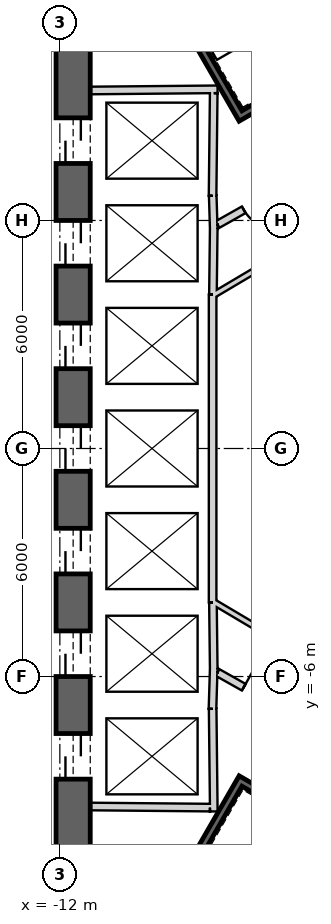
"""IFC4 building model, lengths in metres.
Left out: names, types, materials, properties, quantities, classifications, styles, units other than length and angle.
Written with IfcOpenShell. Run it as: python <this file> out.ifc"""

import sys

from ifc_helpers import new_model, si_unit, direction, frame, frame_2d, origin, place, context, subcontext, project, spatial, rectangle, extrude, element, fill, save


model = new_model("IFC4")
c1 = context("Model", 3, precision=1e-05, world=origin(), true_north=direction((0.0, 1.0)))
c2 = subcontext(c1, "Body", "Model", "MODEL_VIEW")
j1 = project(units=[si_unit("LENGTHUNIT", "METRE"), si_unit("PLANEANGLEUNIT", "RADIAN")], contexts=[c1])
p1 = place(None, origin())
s1 = spatial("IfcSite", under=j1, at=p1, CompositionType="ELEMENT")
p2 = place(p1, origin())
s2 = spatial("IfcBuilding", under=s1, at=p2, CompositionType="ELEMENT")
p3 = place(p2, frame((0.0, 0.0, 357.2)))
s3 = spatial("IfcBuildingStorey", under=s2, at=p3, CompositionType="ELEMENT", Elevation=357.2)
p4 = place(p3, frame((19.475, 2.208, 0.0), z_axis=(0.0, 0.0, 1.0), x_axis=(-0.866028369851, 0.499994862586, 0.0)))
e1 = element("IfcWall", 1, at=p4, inside=s3, PredefinedType="SHEAR", context=c2, shape_type="SweptSolid", body=[
    extrude(rectangle(XDim=31.523, YDim=0.9, at=frame_2d((15.762, 0.0))), origin(), (0.0, 0.0, 1.0), 3.9),
])
p5 = place(p4, frame((7.062, 0.0, 0.0)))
e2 = element("IfcOpeningElement", 2, at=p5, cuts=e1, PredefinedType="OPENING", context=c2, shape_type="SweptSolid", body=[
    extrude(rectangle(XDim=1.2, YDim=2.4, at=frame_2d((0.6, 1.2))), frame((0.0, 0.46, 0.0), z_axis=(0.0, -1.0, 0.0), x_axis=(1.0, 0.0, 0.0)), (0.0, 0.0, 1.0), 0.92),
])
p6 = place(p4, frame((3.612, 0.0, 0.0)))
e3 = element("IfcOpeningElement", 3, at=p6, cuts=e1, PredefinedType="OPENING", context=c2, shape_type="SweptSolid", body=[
    extrude(rectangle(XDim=1.2, YDim=2.4, at=frame_2d((0.6, 1.2))), frame((0.0, 0.46, 0.0), z_axis=(0.0, -1.0, 0.0), x_axis=(1.0, 0.0, 0.0)), (0.0, 0.0, 1.0), 0.92),
])
p7 = place(p4, frame((26.712, 0.0, 0.0)))
e4 = element("IfcOpeningElement", 4, at=p7, cuts=e1, PredefinedType="OPENING", context=c2, shape_type="SweptSolid", body=[
    extrude(rectangle(XDim=1.2, YDim=2.4, at=frame_2d((0.6, 1.2))), frame((0.0, 0.46, 0.0), z_axis=(0.0, -1.0, 0.0), x_axis=(1.0, 0.0, 0.0)), (0.0, 0.0, 1.0), 0.92),
])
p8 = place(p3, frame((-11.65, 15.762, 0.0), z_axis=(0.0, 0.0, 1.0), x_axis=(0.0, -1.0, 0.0)))
e5 = element("IfcWall", 5, at=p8, inside=s3, PredefinedType="SHEAR", context=c2, shape_type="SweptSolid", body=[
    extrude(rectangle(XDim=31.523, YDim=0.9, at=frame_2d((15.762, 0.0))), origin(), (0.0, 0.0, 1.0), 3.9),
])
p9 = place(p8, frame((7.062, 0.0, 0.0)))
e6 = element("IfcOpeningElement", 6, at=p9, cuts=e5, PredefinedType="OPENING", context=c2, shape_type="SweptSolid", body=[
    extrude(rectangle(XDim=1.2, YDim=2.4, at=frame_2d((0.6, 1.2))), frame((0.0, 0.46, 0.0), z_axis=(0.0, -1.0, 0.0), x_axis=(1.0, 0.0, 0.0)), (0.0, 0.0, 1.0), 0.92),
])
p10 = place(p8, frame((9.762, 0.0, 0.0)))
e7 = element("IfcOpeningElement", 7, at=p10, cuts=e5, PredefinedType="OPENING", context=c2, shape_type="SweptSolid", body=[
    extrude(rectangle(XDim=1.2, YDim=2.4, at=frame_2d((0.6, 1.2))), frame((0.0, 0.46, 0.0), z_axis=(0.0, -1.0, 0.0), x_axis=(1.0, 0.0, 0.0)), (0.0, 0.0, 1.0), 0.92),
])
p11 = place(p8, frame((12.462, 0.0, 0.0)))
e8 = element("IfcOpeningElement", 8, at=p11, cuts=e5, PredefinedType="OPENING", context=c2, shape_type="SweptSolid", body=[
    extrude(rectangle(XDim=1.2, YDim=2.4, at=frame_2d((0.6, 1.2))), frame((0.0, 0.46, 0.0), z_axis=(0.0, -1.0, 0.0), x_axis=(1.0, 0.0, 0.0)), (0.0, 0.0, 1.0), 0.92),
])
p12 = place(p8, frame((15.162, 0.0, 0.0)))
e9 = element("IfcOpeningElement", 9, at=p12, cuts=e5, PredefinedType="OPENING", context=c2, shape_type="SweptSolid", body=[
    extrude(rectangle(XDim=1.2, YDim=2.4, at=frame_2d((0.6, 1.2))), frame((0.0, 0.46, 0.0), z_axis=(0.0, -1.0, 0.0), x_axis=(1.0, 0.0, 0.0)), (0.0, 0.0, 1.0), 0.92),
])
p13 = place(p8, frame((17.862, 0.0, 0.0)))
e10 = element("IfcOpeningElement", 10, at=p13, cuts=e5, PredefinedType="OPENING", context=c2, shape_type="SweptSolid", body=[
    extrude(rectangle(XDim=1.2, YDim=2.4, at=frame_2d((0.6, 1.2))), frame((0.0, 0.46, 0.0), z_axis=(0.0, -1.0, 0.0), x_axis=(1.0, 0.0, 0.0)), (0.0, 0.0, 1.0), 0.92),
])
p14 = place(p8, frame((20.562, 0.0, 0.0)))
e11 = element("IfcOpeningElement", 11, at=p14, cuts=e5, PredefinedType="OPENING", context=c2, shape_type="SweptSolid", body=[
    extrude(rectangle(XDim=1.2, YDim=2.4, at=frame_2d((0.6, 1.2))), frame((0.0, 0.46, 0.0), z_axis=(0.0, -1.0, 0.0), x_axis=(1.0, 0.0, 0.0)), (0.0, 0.0, 1.0), 0.92),
])
p15 = place(p8, frame((23.262, 0.0, 0.0)))
e12 = element("IfcOpeningElement", 12, at=p15, cuts=e5, PredefinedType="OPENING", context=c2, shape_type="SweptSolid", body=[
    extrude(rectangle(XDim=1.2, YDim=2.4, at=frame_2d((0.6, 1.2))), frame((0.0, 0.46, 0.0), z_axis=(0.0, -1.0, 0.0), x_axis=(1.0, 0.0, 0.0)), (0.0, 0.0, 1.0), 0.92),
])
p16 = place(p8, frame((3.612, 0.0, 0.0)))
e13 = element("IfcOpeningElement", 13, at=p16, cuts=e5, PredefinedType="OPENING", context=c2, shape_type="SweptSolid", body=[
    extrude(rectangle(XDim=1.2, YDim=2.4, at=frame_2d((0.6, 1.2))), frame((0.0, 0.46, 0.0), z_axis=(0.0, -1.0, 0.0), x_axis=(1.0, 0.0, 0.0)), (0.0, 0.0, 1.0), 0.92),
])
p17 = place(p8, frame((26.712, 0.0, 0.0)))
e14 = element("IfcOpeningElement", 14, at=p17, cuts=e5, PredefinedType="OPENING", context=c2, shape_type="SweptSolid", body=[
    extrude(rectangle(XDim=1.2, YDim=2.4, at=frame_2d((0.6, 1.2))), frame((0.0, 0.46, 0.0), z_axis=(0.0, -1.0, 0.0), x_axis=(1.0, 0.0, 0.0)), (0.0, 0.0, 1.0), 0.92),
])
p18 = place(p3, frame((-7.825, -17.97, 0.0), z_axis=(0.0, 0.0, 1.0), x_axis=(0.866028369851, 0.499994862586, 0.0)))
e15 = element("IfcWall", 15, at=p18, inside=s3, PredefinedType="SHEAR", context=c2, shape_type="SweptSolid", body=[
    extrude(rectangle(XDim=31.523, YDim=0.9, at=frame_2d((15.762, 0.0))), origin(), (0.0, 0.0, 1.0), 3.9),
])
p19 = place(p18, frame((17.862, 0.0, 0.0)))
e16 = element("IfcOpeningElement", 16, at=p19, cuts=e15, PredefinedType="OPENING", context=c2, shape_type="SweptSolid", body=[
    extrude(rectangle(XDim=1.2, YDim=2.4, at=frame_2d((0.6, 1.2))), frame((0.0, 0.46, 0.0), z_axis=(0.0, -1.0, 0.0), x_axis=(1.0, 0.0, 0.0)), (0.0, 0.0, 1.0), 0.92),
])
p20 = place(p18, frame((20.562, 0.0, 0.0)))
e17 = element("IfcOpeningElement", 17, at=p20, cuts=e15, PredefinedType="OPENING", context=c2, shape_type="SweptSolid", body=[
    extrude(rectangle(XDim=1.2, YDim=2.4, at=frame_2d((0.6, 1.2))), frame((0.0, 0.46, 0.0), z_axis=(0.0, -1.0, 0.0), x_axis=(1.0, 0.0, 0.0)), (0.0, 0.0, 1.0), 0.92),
])
p21 = place(p18, frame((26.712, 0.0, 0.0)))
e18 = element("IfcOpeningElement", 18, at=p21, cuts=e15, PredefinedType="OPENING", context=c2, shape_type="SweptSolid", body=[
    extrude(rectangle(XDim=1.2, YDim=2.4, at=frame_2d((0.6, 1.2))), frame((0.0, 0.46, 0.0), z_axis=(0.0, -1.0, 0.0), x_axis=(1.0, 0.0, 0.0)), (0.0, 0.0, 1.0), 0.92),
])
p22 = place(p18, frame((3.612, 0.0, 0.0)))
e19 = element("IfcOpeningElement", 19, at=p22, cuts=e15, PredefinedType="OPENING", context=c2, shape_type="SweptSolid", body=[
    extrude(rectangle(XDim=1.2, YDim=2.4, at=frame_2d((0.6, 1.2))), frame((0.0, 0.46, 0.0), z_axis=(0.0, -1.0, 0.0), x_axis=(1.0, 0.0, 0.0)), (0.0, 0.0, 1.0), 0.92),
])
p23 = place(p3, frame((-11.2, 9.42, 0.0), z_axis=(0.0, 0.0, 1.0), x_axis=(0.999957167047, 0.009255488683, 0.0)))
e20 = element("IfcWall", 20, at=p23, inside=s3, PredefinedType="PLUMBINGWALL", context=c2, shape_type="SweptSolid", body=[
    extrude(rectangle(XDim=3.35, YDim=0.2, at=frame_2d((1.675, 0.0))), origin(), (0.0, 0.0, 1.0), 3.6),
])
p24 = place(p3, frame((-7.951, 9.35, 0.0), z_axis=(0.0, 0.0, 1.0), x_axis=(-0.011120469654, -0.999938165666, 0.0)))
e21 = element("IfcWall", 21, at=p24, inside=s3, PredefinedType="PLUMBINGWALL", context=c2, shape_type="SweptSolid", body=[
    extrude(rectangle(XDim=2.7, YDim=0.2, at=frame_2d((1.35, 0.0))), origin(), (0.0, 0.0, 1.0), 3.6),
])
p25 = place(p3, frame((-7.977, 6.65, 0.0), z_axis=(0.0, 0.0, 1.0), x_axis=(0.030861509705, -0.999523670164, 0.0)))
e22 = element("IfcWall", 22, at=p25, inside=s3, PredefinedType="PLUMBINGWALL", context=c2, shape_type="SweptSolid", body=[
    extrude(rectangle(XDim=0.878, YDim=0.2, at=frame_2d((0.439, 0.0))), origin(), (0.0, 0.0, 1.0), 3.6),
])
p26 = place(p3, frame((-7.949, 5.895, 0.0), z_axis=(0.0, 0.0, 1.0), x_axis=(-0.012042535896, -0.999927486035, 0.0)))
e23 = element("IfcWall", 23, at=p26, inside=s3, PredefinedType="PLUMBINGWALL", context=c2, shape_type="SweptSolid", body=[
    extrude(rectangle(XDim=1.845, YDim=0.2, at=frame_2d((0.922, 0.0))), origin(), (0.0, 0.0, 1.0), 3.6),
])
p27 = place(p3, frame((-7.98, 4.05, 0.0), z_axis=(0.0, 0.0, 1.0), x_axis=(0.0, -1.0, 0.0)))
e24 = element("IfcWall", 24, at=p27, inside=s3, PredefinedType="PLUMBINGWALL", context=c2, shape_type="SweptSolid", body=[
    extrude(rectangle(XDim=8.1, YDim=0.2, at=frame_2d((4.05, 0.0))), origin(), (0.0, 0.0, 1.0), 3.6),
])
p28 = place(p3, frame((-7.95, -5.772, 0.0), z_axis=(0.0, 0.0, 1.0), x_axis=(-0.030803413295, -0.999525462272, 0.0)))
e25 = element("IfcWall", 25, at=p28, inside=s3, PredefinedType="PLUMBINGWALL", context=c2, shape_type="SweptSolid", body=[
    extrude(rectangle(XDim=1.078, YDim=0.2, at=frame_2d((0.539, 0.0))), origin(), (0.0, 0.0, 1.0), 3.6),
])
p29 = place(p3, frame((-7.971, -4.05, 0.0), z_axis=(0.0, 0.0, 1.0), x_axis=(0.012042535896, -0.999927486035, 0.0)))
e26 = element("IfcWall", 26, at=p29, inside=s3, PredefinedType="PLUMBINGWALL", context=c2, shape_type="SweptSolid", body=[
    extrude(rectangle(XDim=1.845, YDim=0.2, at=frame_2d((0.922, 0.0))), origin(), (0.0, 0.0, 1.0), 3.6),
])
p30 = place(p3, frame((-7.979, -6.85, 0.0), z_axis=(0.0, 0.0, 1.0), x_axis=(0.011121475088, -0.999938154483, 0.0)))
e27 = element("IfcWall", 27, at=p30, inside=s3, PredefinedType="PLUMBINGWALL", context=c2, shape_type="SweptSolid", body=[
    extrude(rectangle(XDim=2.7, YDim=0.2, at=frame_2d((1.35, 0.0))), origin(), (0.0, 0.0, 1.0), 3.6),
])
p31 = place(p3, frame((-8.05, -9.449, 0.0), z_axis=(0.0, 0.0, 1.0), x_axis=(-0.999957467379, 0.009222983926, 0.0)))
e28 = element("IfcWall", 28, at=p31, inside=s3, PredefinedType="PLUMBINGWALL", context=c2, shape_type="SweptSolid", body=[
    extrude(rectangle(XDim=3.15, YDim=0.2, at=frame_2d((1.575, 0.0))), origin(), (0.0, 0.0, 1.0), 3.6),
])
p32 = place(p3, frame((-11.245, 15.678, -0.3), z_axis=(0.0, 0.0, 1.0), x_axis=(0.499977274689, -0.866038523851, 0.0)))
e29 = element("IfcWall", 29, at=p32, inside=s3, PredefinedType="SHEAR", context=c2, shape_type="SweptSolid", body=[
    extrude(rectangle(XDim=8.1, YDim=0.2, at=frame_2d((4.05, 0.0))), origin(), (0.0, 0.0, 1.0), 3.9),
])
p33 = place(p3, frame((-7.159, 8.8, -0.3), z_axis=(0.0, 0.0, 1.0), x_axis=(0.866047807691, 0.499961193289, 0.0)))
e30 = element("IfcWall", 30, at=p33, inside=s3, PredefinedType="SHEAR", context=c2, shape_type="SweptSolid", body=[
    extrude(rectangle(XDim=3.6, YDim=0.2, at=frame_2d((1.8, 0.0))), origin(), (0.0, 0.0, 1.0), 3.9),
])
p34 = place(p33, frame((1.25, 0.0, 0.3)))
e31 = element("IfcOpeningElement", 31, at=p34, cuts=e30, PredefinedType="OPENING", context=c2, shape_type="SweptSolid", body=[
    extrude(rectangle(XDim=1.1, YDim=2.1, at=frame_2d((0.55, 1.05))), frame((0.0, 0.11, 0.0), z_axis=(0.0, -1.0, 0.0), x_axis=(1.0, 0.0, 0.0)), (0.0, 0.0, 1.0), 0.22),
])
p35 = place(p3, frame((-7.196, -8.663, -0.3), z_axis=(0.0, 0.0, 1.0), x_axis=(-0.499997992926, -0.866026562566, 0.0)))
e32 = element("IfcWall", 32, at=p35, inside=s3, PredefinedType="SHEAR", context=c2, shape_type="SweptSolid", body=[
    extrude(rectangle(XDim=7.9, YDim=0.2, at=frame_2d((3.95, 0.0))), origin(), (0.0, 0.0, 1.0), 3.9),
])
p36 = place(p3, frame((-4.041, -10.599, -0.3), z_axis=(0.0, 0.0, 1.0), x_axis=(-0.866047807691, 0.499961193289, 0.0)))
e33 = element("IfcWall", 33, at=p36, inside=s3, PredefinedType="SHEAR", context=c2, shape_type="SweptSolid", body=[
    extrude(rectangle(XDim=3.6, YDim=0.2, at=frame_2d((1.8, 0.0))), origin(), (0.0, 0.0, 1.0), 3.9),
])
p37 = place(p36, frame((1.25, 0.0, 0.3)))
e34 = element("IfcOpeningElement", 34, at=p37, cuts=e33, PredefinedType="OPENING", context=c2, shape_type="SweptSolid", body=[
    extrude(rectangle(XDim=1.1, YDim=2.1, at=frame_2d((0.55, 1.05))), frame((0.0, 0.11, 0.0), z_axis=(0.0, -1.0, 0.0), x_axis=(1.0, 0.0, 0.0)), (0.0, 0.0, 1.0), 0.22),
])
p38 = place(p3, frame((-5.6, 7.16, 0.0), z_axis=(0.0, 0.0, 1.0), x_axis=(-0.871363259478, -0.490638431059, 0.0)))
e35 = element("IfcWall", 35, at=p38, inside=s3, PredefinedType="PARTITIONING", context=c2, shape_type="SweptSolid", body=[
    extrude(rectangle(XDim=2.581, YDim=0.2, at=frame_2d((1.291, 0.0))), origin(), (0.0, 0.0, 1.0), 3.6),
])
p39 = place(p38, frame((0.791, 0.0, 0.0)))
e36 = element("IfcOpeningElement", 36, at=p39, cuts=e35, PredefinedType="OPENING", context=c2, shape_type="SweptSolid", body=[
    extrude(rectangle(XDim=1.0, YDim=2.1, at=frame_2d((0.5, 1.05))), frame((0.0, 0.11, 0.0), z_axis=(0.0, -1.0, 0.0), x_axis=(1.0, 0.0, 0.0)), (0.0, 0.0, 1.0), 0.22),
])
p40 = place(p3, frame((-7.849, -5.894, 0.0), z_axis=(0.0, 0.0, 1.0), x_axis=(0.871363259478, -0.490638431059, 0.0)))
e37 = element("IfcWall", 37, at=p40, inside=s3, PredefinedType="PARTITIONING", context=c2, shape_type="SweptSolid", body=[
    extrude(rectangle(XDim=2.581, YDim=0.2, at=frame_2d((1.291, 0.0))), origin(), (0.0, 0.0, 1.0), 3.6),
])
p41 = place(p40, frame((0.791, 0.0, 0.0)))
e38 = element("IfcOpeningElement", 38, at=p41, cuts=e37, PredefinedType="OPENING", context=c2, shape_type="SweptSolid", body=[
    extrude(rectangle(XDim=1.0, YDim=2.1, at=frame_2d((0.5, 1.05))), frame((0.0, 0.11, 0.0), z_axis=(0.0, -1.0, 0.0), x_axis=(1.0, 0.0, 0.0)), (0.0, 0.0, 1.0), 0.22),
])
p42 = place(p3, frame((-6.037, 5.176, 0.0), z_axis=(0.0, 0.0, 1.0), x_axis=(-0.860106072674, -0.510115225953, 0.0)))
e39 = element("IfcWall", 39, at=p42, inside=s3, PredefinedType="PARTITIONING", context=c2, shape_type="SweptSolid", body=[
    extrude(rectangle(XDim=2.225, YDim=0.12, at=frame_2d((1.112, 0.0))), origin(), (0.0, 0.0, 1.0), 3.6),
])
p43 = place(p3, frame((-7.95, -4.041, 0.0), z_axis=(0.0, 0.0, 1.0), x_axis=(0.860112457103, -0.510104461004, 0.0)))
e40 = element("IfcWall", 40, at=p43, inside=s3, PredefinedType="PARTITIONING", context=c2, shape_type="SweptSolid", body=[
    extrude(rectangle(XDim=2.104, YDim=0.12, at=frame_2d((1.052, 0.0))), origin(), (0.0, 0.0, 1.0), 3.6),
])
p44 = place(p39, origin())
e41 = element("IfcDoor", 41, at=p44, inside=s3, OperationType="SINGLE_SWING_RIGHT", PredefinedType="USERDEFINED", context=c2, shape_type="SweptSolid", body=[
    extrude(rectangle(XDim=1.0, YDim=2.1, at=frame_2d((0.5, 1.05))), frame((0.0, 0.025, 0.0), z_axis=(0.0, -1.0, 0.0), x_axis=(1.0, 0.0, 0.0)), (0.0, 0.0, 1.0), 0.05),
])
fill(e36, e41)
p45 = place(p41, origin())
e42 = element("IfcDoor", 42, at=p45, inside=s3, OperationType="SINGLE_SWING_LEFT", PredefinedType="USERDEFINED", context=c2, shape_type="SweptSolid", body=[
    extrude(rectangle(XDim=1.0, YDim=2.1, at=frame_2d((0.5, 1.05))), frame((0.0, 0.025, 0.0), z_axis=(0.0, -1.0, 0.0), x_axis=(1.0, 0.0, 0.0)), (0.0, 0.0, 1.0), 0.05),
])
fill(e38, e42)
p46 = place(p9, origin())
e43 = element("IfcDoor", 43, at=p46, inside=s3, OperationType="SLIDING_TO_LEFT", PredefinedType="USERDEFINED", context=c2, shape_type="SweptSolid", body=[
    extrude(rectangle(XDim=1.2, YDim=2.4, at=frame_2d((0.6, 1.2))), frame((0.0, 0.025, 0.0), z_axis=(0.0, -1.0, 0.0), x_axis=(1.0, 0.0, 0.0)), (0.0, 0.0, 1.0), 0.05),
])
fill(e6, e43)
p47 = place(p10, origin())
e44 = element("IfcDoor", 44, at=p47, inside=s3, OperationType="SLIDING_TO_LEFT", PredefinedType="USERDEFINED", context=c2, shape_type="SweptSolid", body=[
    extrude(rectangle(XDim=1.2, YDim=2.4, at=frame_2d((0.6, 1.2))), frame((0.0, 0.025, 0.0), z_axis=(0.0, -1.0, 0.0), x_axis=(1.0, 0.0, 0.0)), (0.0, 0.0, 1.0), 0.05),
])
fill(e7, e44)
p48 = place(p11, origin())
e45 = element("IfcDoor", 45, at=p48, inside=s3, OperationType="SLIDING_TO_LEFT", PredefinedType="USERDEFINED", context=c2, shape_type="SweptSolid", body=[
    extrude(rectangle(XDim=1.2, YDim=2.4, at=frame_2d((0.6, 1.2))), frame((0.0, 0.025, 0.0), z_axis=(0.0, -1.0, 0.0), x_axis=(1.0, 0.0, 0.0)), (0.0, 0.0, 1.0), 0.05),
])
fill(e8, e45)
p49 = place(p12, origin())
e46 = element("IfcDoor", 46, at=p49, inside=s3, OperationType="SLIDING_TO_LEFT", PredefinedType="USERDEFINED", context=c2, shape_type="SweptSolid", body=[
    extrude(rectangle(XDim=1.2, YDim=2.4, at=frame_2d((0.6, 1.2))), frame((0.0, 0.025, 0.0), z_axis=(0.0, -1.0, 0.0), x_axis=(1.0, 0.0, 0.0)), (0.0, 0.0, 1.0), 0.05),
])
fill(e9, e46)
p50 = place(p13, origin())
e47 = element("IfcDoor", 47, at=p50, inside=s3, OperationType="SLIDING_TO_LEFT", PredefinedType="USERDEFINED", context=c2, shape_type="SweptSolid", body=[
    extrude(rectangle(XDim=1.2, YDim=2.4, at=frame_2d((0.6, 1.2))), frame((0.0, 0.025, 0.0), z_axis=(0.0, -1.0, 0.0), x_axis=(1.0, 0.0, 0.0)), (0.0, 0.0, 1.0), 0.05),
])
fill(e10, e47)
p51 = place(p14, origin())
e48 = element("IfcDoor", 48, at=p51, inside=s3, OperationType="SLIDING_TO_LEFT", PredefinedType="USERDEFINED", context=c2, shape_type="SweptSolid", body=[
    extrude(rectangle(XDim=1.2, YDim=2.4, at=frame_2d((0.6, 1.2))), frame((0.0, 0.025, 0.0), z_axis=(0.0, -1.0, 0.0), x_axis=(1.0, 0.0, 0.0)), (0.0, 0.0, 1.0), 0.05),
])
fill(e11, e48)
p52 = place(p15, origin())
e49 = element("IfcDoor", 49, at=p52, inside=s3, OperationType="SLIDING_TO_LEFT", PredefinedType="USERDEFINED", context=c2, shape_type="SweptSolid", body=[
    extrude(rectangle(XDim=1.2, YDim=2.4, at=frame_2d((0.6, 1.2))), frame((0.0, 0.025, 0.0), z_axis=(0.0, -1.0, 0.0), x_axis=(1.0, 0.0, 0.0)), (0.0, 0.0, 1.0), 0.05),
])
fill(e12, e49)
save(model, sys.argv[1])
